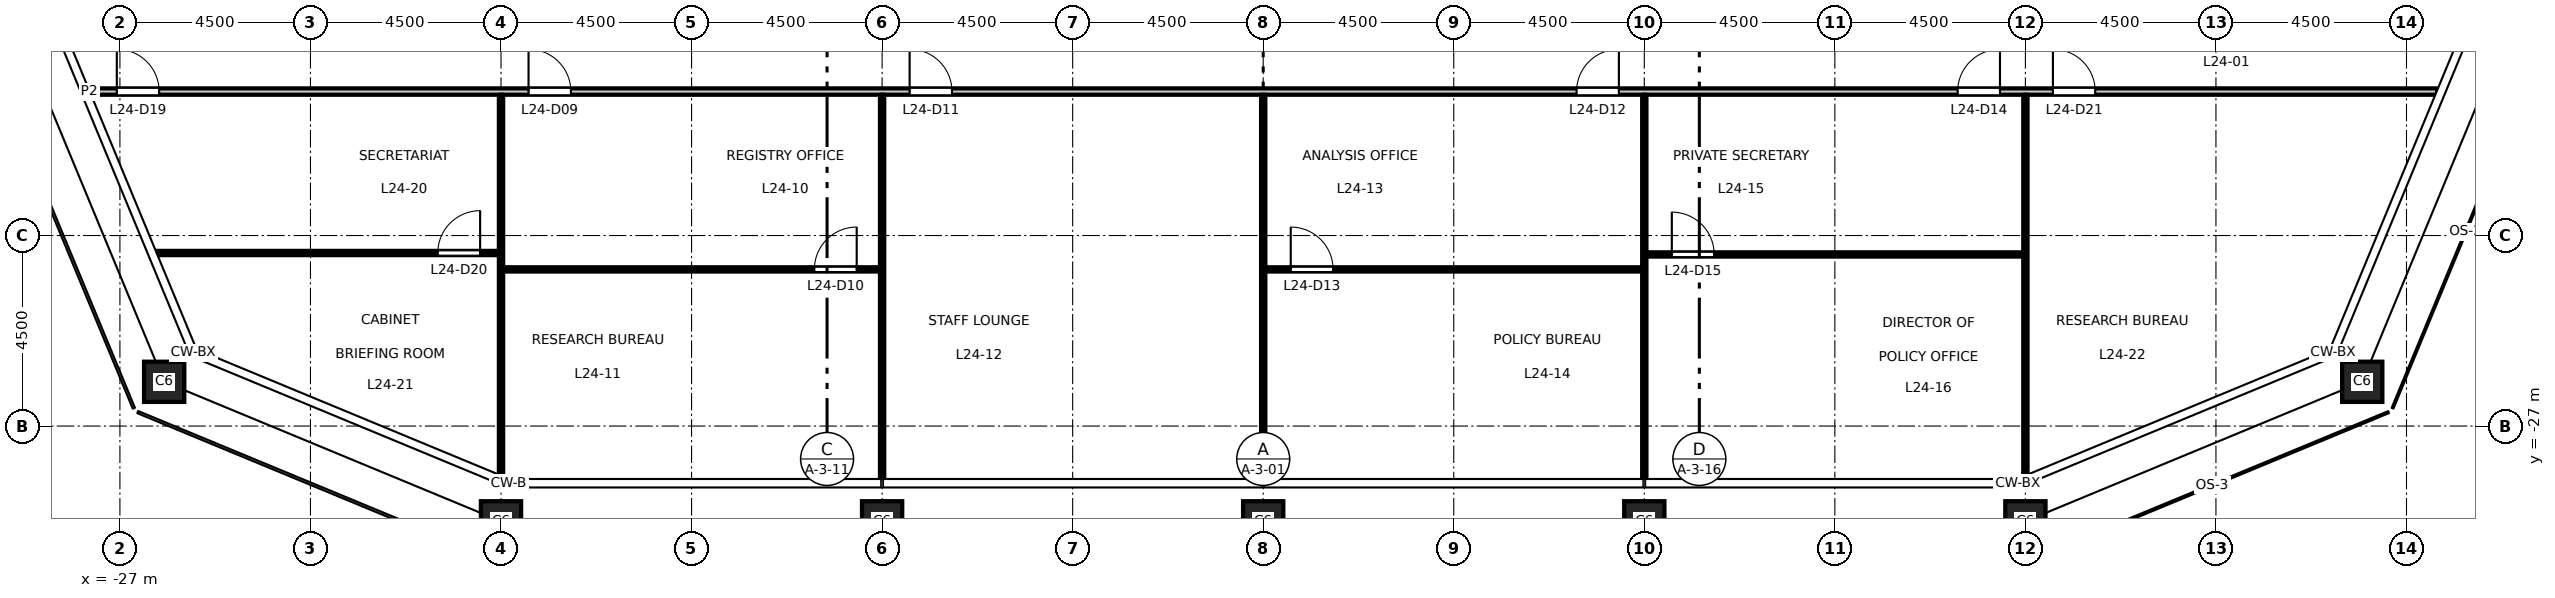
"""IFC4 building model, lengths in metres.
Left out: names, types, materials, properties, quantities, classifications, styles, units other than length and angle.
Written with IfcOpenShell. Run it as: python <this file> out.ifc"""

import sys

from ifc_helpers import new_model, si_unit, direction, frame, frame_2d, origin, origin_2d, place, context, subcontext, project, spatial, rectangle, hollow_rectangle, extrude, element, fill, save


model = new_model("IFC4")
c1 = context("Model", 3, precision=1e-05, world=origin(), true_north=direction((0.0, 1.0)))
c2 = subcontext(c1, "Body", "Model", "MODEL_VIEW")
j1 = project(units=[si_unit("LENGTHUNIT", "METRE"), si_unit("PLANEANGLEUNIT", "RADIAN")], contexts=[c1])
p1 = place(None, origin())
s1 = spatial("IfcSite", under=j1, at=p1, CompositionType="ELEMENT")
p2 = place(p1, origin())
s2 = spatial("IfcBuilding", under=s1, at=p2, CompositionType="ELEMENT")
p3 = place(p2, frame((0.0, 0.0, 113.7)))
s3 = spatial("IfcBuildingStorey", under=s2, at=p3, CompositionType="ELEMENT", Elevation=113.7)
for number, where, z_axis, x_axis in (
    (1, (-18.0, -29.25, 0.0), (0.0, 0.0, 1.0), (1.0, 0.0, 0.0)),
    (2, (-9.0, -29.25, 0.0), (0.0, 0.0, 1.0), (1.0, 0.0, 0.0)),
    (3, (0.0, -29.25, 0.0), (0.0, 0.0, 1.0), (1.0, 0.0, 0.0)),
    (4, (9.0, -29.25, 0.0), (0.0, 0.0, 1.0), (1.0, 0.0, 0.0)),
    (5, (18.0, -29.25, 0.0), (0.0, 0.0, 1.0), (1.0, 0.0, 0.0)),
    (6, (25.955, -25.955, 0.0), (0.0, 0.0, 1.0), (1.0, 0.0, 0.0)),
    (7, (-25.955, -25.955, 0.0), (0.0, 0.0, 1.0), (1.0, 0.0, 0.0)),
):
    element("IfcColumn", number, at=place(p3, frame(where, z_axis=z_axis, x_axis=x_axis)), inside=s3, PredefinedType="COLUMN", context=c2, shape_type="SweptSolid", body=[
        extrude(hollow_rectangle(XDim=0.95, YDim=0.95, WallThickness=0.055, at=origin_2d()), origin(), (0.0, 0.0, 1.0), 4.5),
    ])
p4 = place(p3, frame((-17.95, -23.3, 0.0), z_axis=(0.0, 0.0, 1.0), x_axis=(1.0, 0.0, 0.0)))
e8 = element("IfcWall", 8, at=p4, inside=s3, PredefinedType="PARTITIONING", context=c2, shape_type="SweptSolid", body=[
    extrude(rectangle(XDim=8.9, YDim=0.1, at=frame_2d((4.45, 0.0))), origin(), (0.0, 0.0, 1.0), 4.35),
])
p5 = place(p4, frame((7.35, 0.0, 0.0)))
e9 = element("IfcOpeningElement", 9, at=p5, cuts=e8, PredefinedType="OPENING", context=c2, shape_type="SweptSolid", body=[
    extrude(rectangle(XDim=1.0, YDim=2.1, at=frame_2d((0.5, 1.05))), frame((0.0, 0.06, 0.0), z_axis=(0.0, -1.0, 0.0), x_axis=(1.0, 0.0, 0.0)), (0.0, 0.0, 1.0), 0.12),
])
p6 = place(p3, frame((0.05, -23.3, 0.0), z_axis=(0.0, 0.0, 1.0), x_axis=(1.0, 0.0, 0.0)))
e10 = element("IfcWall", 10, at=p6, inside=s3, PredefinedType="PARTITIONING", context=c2, shape_type="SweptSolid", body=[
    extrude(rectangle(XDim=8.9, YDim=0.1, at=frame_2d((4.45, 0.0))), origin(), (0.0, 0.0, 1.0), 4.35),
])
p7 = place(p6, frame((0.6, 0.0, 0.0)))
e11 = element("IfcOpeningElement", 11, at=p7, cuts=e10, PredefinedType="OPENING", context=c2, shape_type="SweptSolid", body=[
    extrude(rectangle(XDim=1.0, YDim=2.1, at=frame_2d((0.5, 1.05))), frame((0.0, 0.06, 0.0), z_axis=(0.0, -1.0, 0.0), x_axis=(1.0, 0.0, 0.0)), (0.0, 0.0, 1.0), 0.12),
])
p8 = place(p3, frame((9.05, -22.947, 0.0), z_axis=(0.0, 0.0, 1.0), x_axis=(1.0, 0.0, 0.0)))
e12 = element("IfcWall", 12, at=p8, inside=s3, PredefinedType="PARTITIONING", context=c2, shape_type="SweptSolid", body=[
    extrude(rectangle(XDim=8.9, YDim=0.1, at=frame_2d((4.45, 0.0))), origin(), (0.0, 0.0, 1.0), 4.35),
])
p9 = place(p8, frame((0.6, 0.0, 0.0)))
e13 = element("IfcOpeningElement", 13, at=p9, cuts=e12, PredefinedType="OPENING", context=c2, shape_type="SweptSolid", body=[
    extrude(rectangle(XDim=1.0, YDim=2.1, at=frame_2d((0.5, 1.05))), frame((0.0, 0.06, 0.0), z_axis=(0.0, -1.0, 0.0), x_axis=(1.0, 0.0, 0.0)), (0.0, 0.0, 1.0), 0.12),
])
p10 = place(p3, frame((-26.143, -22.913, 0.0), z_axis=(0.0, 0.0, 1.0), x_axis=(1.0, 0.0, 0.0)))
e14 = element("IfcWall", 14, at=p10, inside=s3, PredefinedType="PARTITIONING", context=c2, shape_type="SweptSolid", body=[
    extrude(rectangle(XDim=8.093, YDim=0.1, at=frame_2d((4.046, 0.0))), origin(), (0.0, 0.0, 1.0), 4.35),
])
p11 = place(p10, frame((6.65, 0.0, 0.0)))
e15 = element("IfcOpeningElement", 15, at=p11, cuts=e14, PredefinedType="OPENING", context=c2, shape_type="SweptSolid", body=[
    extrude(rectangle(XDim=1.0, YDim=2.1, at=frame_2d((0.5, 1.05))), frame((0.0, 0.06, 0.0), z_axis=(0.0, -1.0, 0.0), x_axis=(1.0, 0.0, 0.0)), (0.0, 0.0, 1.0), 0.12),
])
p12 = place(p3, frame((-27.723, -19.1, 0.0), z_axis=(0.0, 0.0, 1.0), x_axis=(1.0, 0.0, 0.0)))
e16 = element("IfcWall", 16, at=p12, inside=s3, PredefinedType="PARTITIONING", context=c2, shape_type="SweptSolid", body=[
    extrude(rectangle(XDim=55.446, YDim=0.15, at=frame_2d((27.723, 0.0))), origin(), (0.0, 0.0, 1.0), 4.35),
])
p13 = place(p12, frame((10.373, 0.0, 0.0)))
e17 = element("IfcOpeningElement", 17, at=p13, cuts=e16, PredefinedType="OPENING", context=c2, shape_type="SweptSolid", body=[
    extrude(rectangle(XDim=1.0, YDim=2.1, at=frame_2d((0.5, 1.05))), frame((0.0, 0.085, 0.0), z_axis=(0.0, -1.0, 0.0), x_axis=(1.0, 0.0, 0.0)), (0.0, 0.0, 1.0), 0.17),
])
p14 = place(p12, frame((19.373, 0.0, 0.0)))
e18 = element("IfcOpeningElement", 18, at=p14, cuts=e16, PredefinedType="OPENING", context=c2, shape_type="SweptSolid", body=[
    extrude(rectangle(XDim=1.0, YDim=2.1, at=frame_2d((0.5, 1.05))), frame((0.0, 0.085, 0.0), z_axis=(0.0, -1.0, 0.0), x_axis=(1.0, 0.0, 0.0)), (0.0, 0.0, 1.0), 0.17),
])
p15 = place(p12, frame((35.123, 0.0, 0.0)))
e19 = element("IfcOpeningElement", 19, at=p15, cuts=e16, PredefinedType="OPENING", context=c2, shape_type="SweptSolid", body=[
    extrude(rectangle(XDim=1.0, YDim=2.1, at=frame_2d((0.5, 1.05))), frame((0.0, 0.085, 0.0), z_axis=(0.0, -1.0, 0.0), x_axis=(1.0, 0.0, 0.0)), (0.0, 0.0, 1.0), 0.17),
])
p16 = place(p12, frame((44.123, 0.0, 0.0)))
e20 = element("IfcOpeningElement", 20, at=p16, cuts=e16, PredefinedType="OPENING", context=c2, shape_type="SweptSolid", body=[
    extrude(rectangle(XDim=1.0, YDim=2.1, at=frame_2d((0.5, 1.05))), frame((0.0, 0.085, 0.0), z_axis=(0.0, -1.0, 0.0), x_axis=(1.0, 0.0, 0.0)), (0.0, 0.0, 1.0), 0.17),
])
p17 = place(p12, frame((0.65, 0.0, 0.0)))
e21 = element("IfcOpeningElement", 21, at=p17, cuts=e16, PredefinedType="OPENING", context=c2, shape_type="SweptSolid", body=[
    extrude(rectangle(XDim=1.0, YDim=2.1, at=frame_2d((0.5, 1.05))), frame((0.0, 0.085, 0.0), z_axis=(0.0, -1.0, 0.0), x_axis=(1.0, 0.0, 0.0)), (0.0, 0.0, 1.0), 0.17),
])
p18 = place(p12, frame((46.373, 0.0, 0.0)))
e22 = element("IfcOpeningElement", 22, at=p18, cuts=e16, PredefinedType="OPENING", context=c2, shape_type="SweptSolid", body=[
    extrude(rectangle(XDim=1.0, YDim=2.1, at=frame_2d((0.5, 1.05))), frame((0.0, 0.085, 0.0), z_axis=(0.0, -1.0, 0.0), x_axis=(1.0, 0.0, 0.0)), (0.0, 0.0, 1.0), 0.17),
])
p19 = place(p3, frame((-18.0, -28.178, 0.0), z_axis=(0.0, 0.0, 1.0), x_axis=(0.0, 1.0, 0.0)))
e23 = element("IfcWall", 23, at=p19, inside=s3, PredefinedType="PARTITIONING", context=c2, shape_type="SweptSolid", body=[
    extrude(rectangle(XDim=9.003, YDim=0.1, at=frame_2d((4.501, 0.0))), origin(), (0.0, 0.0, 1.0), 3.45),
])
for number, where, z_axis, x_axis in (
    (24, (-9.0, -28.26, 0.0), (0.0, 0.0, 1.0), (0.0, 1.0, 0.0)),
    (25, (0.0, -28.26, 0.0), (0.0, 0.0, 1.0), (0.0, 1.0, 0.0)),
    (26, (9.0, -28.26, 0.0), (0.0, 0.0, 1.0), (0.0, 1.0, 0.0)),
):
    element("IfcWall", number, at=place(p3, frame(where, z_axis=z_axis, x_axis=x_axis)), inside=s3, PredefinedType="PARTITIONING", context=c2, shape_type="SweptSolid", body=[
        extrude(rectangle(XDim=9.085, YDim=0.1, at=frame_2d((4.542, 0.0))), origin(), (0.0, 0.0, 1.0), 3.45),
    ])
p20 = place(p3, frame((18.0, -28.178, 0.0), z_axis=(0.0, 0.0, 1.0), x_axis=(0.0, 1.0, 0.0)))
e27 = element("IfcWall", 27, at=p20, inside=s3, PredefinedType="PARTITIONING", context=c2, shape_type="SweptSolid", body=[
    extrude(rectangle(XDim=9.003, YDim=0.1, at=frame_2d((4.501, 0.0))), origin(), (0.0, 0.0, 1.0), 3.45),
])
p21 = place(p13, origin())
e28 = element("IfcDoor", 28, at=p21, inside=s3, OperationType="SINGLE_SWING_LEFT", PredefinedType="DOOR", context=c2, shape_type="SweptSolid", body=[
    extrude(rectangle(XDim=1.0, YDim=2.1, at=frame_2d((0.5, 1.05))), frame((0.0, 0.025, 0.0), z_axis=(0.0, -1.0, 0.0), x_axis=(1.0, 0.0, 0.0)), (0.0, 0.0, 1.0), 0.05),
])
fill(e17, e28)
p22 = place(p5, origin())
e29 = element("IfcDoor", 29, at=p22, inside=s3, OperationType="SINGLE_SWING_RIGHT", PredefinedType="DOOR", context=c2, shape_type="SweptSolid", body=[
    extrude(rectangle(XDim=1.0, YDim=2.1, at=frame_2d((0.5, 1.05))), frame((0.0, 0.025, 0.0), z_axis=(0.0, -1.0, 0.0), x_axis=(1.0, 0.0, 0.0)), (0.0, 0.0, 1.0), 0.05),
])
fill(e9, e29)
p23 = place(p14, origin())
e30 = element("IfcDoor", 30, at=p23, inside=s3, OperationType="SINGLE_SWING_LEFT", PredefinedType="DOOR", context=c2, shape_type="SweptSolid", body=[
    extrude(rectangle(XDim=1.0, YDim=2.1, at=frame_2d((0.5, 1.05))), frame((0.0, 0.025, 0.0), z_axis=(0.0, -1.0, 0.0), x_axis=(1.0, 0.0, 0.0)), (0.0, 0.0, 1.0), 0.05),
])
fill(e18, e30)
p24 = place(p15, origin())
e31 = element("IfcDoor", 31, at=p24, inside=s3, OperationType="SINGLE_SWING_RIGHT", PredefinedType="DOOR", context=c2, shape_type="SweptSolid", body=[
    extrude(rectangle(XDim=1.0, YDim=2.1, at=frame_2d((0.5, 1.05))), frame((0.0, 0.025, 0.0), z_axis=(0.0, -1.0, 0.0), x_axis=(1.0, 0.0, 0.0)), (0.0, 0.0, 1.0), 0.05),
])
fill(e19, e31)
p25 = place(p7, origin())
e32 = element("IfcDoor", 32, at=p25, inside=s3, OperationType="SINGLE_SWING_LEFT", PredefinedType="DOOR", context=c2, shape_type="SweptSolid", body=[
    extrude(rectangle(XDim=1.0, YDim=2.1, at=frame_2d((0.5, 1.05))), frame((0.0, 0.025, 0.0), z_axis=(0.0, -1.0, 0.0), x_axis=(1.0, 0.0, 0.0)), (0.0, 0.0, 1.0), 0.05),
])
fill(e11, e32)
p26 = place(p16, origin())
e33 = element("IfcDoor", 33, at=p26, inside=s3, OperationType="SINGLE_SWING_RIGHT", PredefinedType="DOOR", context=c2, shape_type="SweptSolid", body=[
    extrude(rectangle(XDim=1.0, YDim=2.1, at=frame_2d((0.5, 1.05))), frame((0.0, 0.025, 0.0), z_axis=(0.0, -1.0, 0.0), x_axis=(1.0, 0.0, 0.0)), (0.0, 0.0, 1.0), 0.05),
])
fill(e20, e33)
p27 = place(p9, origin())
e34 = element("IfcDoor", 34, at=p27, inside=s3, OperationType="SINGLE_SWING_LEFT", PredefinedType="DOOR", context=c2, shape_type="SweptSolid", body=[
    extrude(rectangle(XDim=1.0, YDim=2.1, at=frame_2d((0.5, 1.05))), frame((0.0, 0.025, 0.0), z_axis=(0.0, -1.0, 0.0), x_axis=(1.0, 0.0, 0.0)), (0.0, 0.0, 1.0), 0.05),
])
fill(e13, e34)
p28 = place(p17, origin())
e35 = element("IfcDoor", 35, at=p28, inside=s3, OperationType="SINGLE_SWING_LEFT", PredefinedType="DOOR", context=c2, shape_type="SweptSolid", body=[
    extrude(rectangle(XDim=1.0, YDim=2.1, at=frame_2d((0.5, 1.05))), frame((0.0, 0.025, 0.0), z_axis=(0.0, -1.0, 0.0), x_axis=(1.0, 0.0, 0.0)), (0.0, 0.0, 1.0), 0.05),
])
fill(e21, e35)
p29 = place(p11, origin())
e36 = element("IfcDoor", 36, at=p29, inside=s3, OperationType="SINGLE_SWING_RIGHT", PredefinedType="DOOR", context=c2, shape_type="SweptSolid", body=[
    extrude(rectangle(XDim=1.0, YDim=2.1, at=frame_2d((0.5, 1.05))), frame((0.0, 0.025, 0.0), z_axis=(0.0, -1.0, 0.0), x_axis=(1.0, 0.0, 0.0)), (0.0, 0.0, 1.0), 0.05),
])
fill(e15, e36)
p30 = place(p18, origin())
e37 = element("IfcDoor", 37, at=p30, inside=s3, OperationType="SINGLE_SWING_LEFT", PredefinedType="DOOR", context=c2, shape_type="SweptSolid", body=[
    extrude(rectangle(XDim=1.0, YDim=2.1, at=frame_2d((0.5, 1.05))), frame((0.0, 0.025, 0.0), z_axis=(0.0, -1.0, 0.0), x_axis=(1.0, 0.0, 0.0)), (0.0, 0.0, 1.0), 0.05),
])
fill(e22, e37)
save(model, sys.argv[1])
